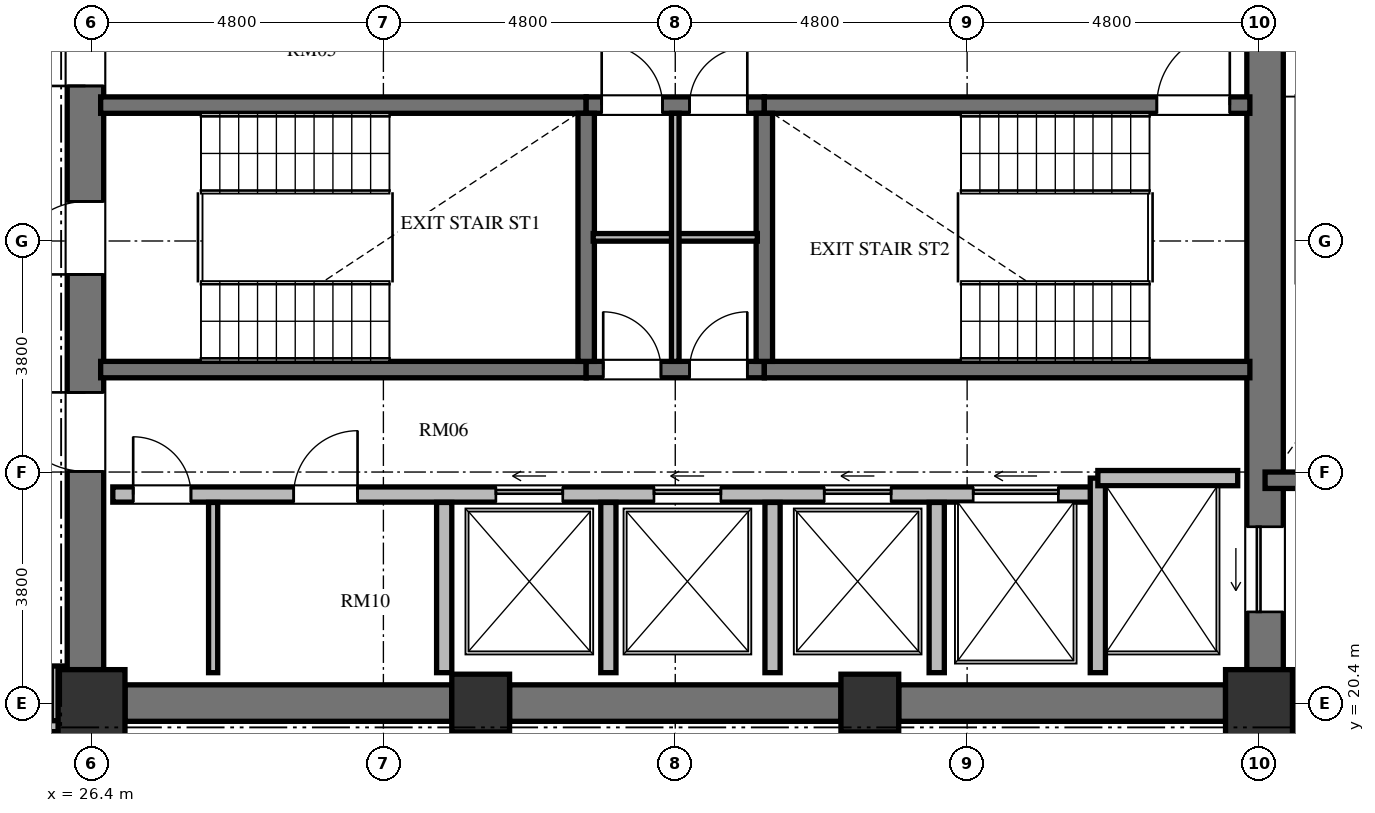
"""IFC4 building model, lengths in metres.
Left out: names, types, materials, properties, quantities, classifications, styles, units other than length and angle.
Written with IfcOpenShell. Run it as: python <this file> out.ifc"""

import sys

from ifc_helpers import new_model, si_unit, direction, frame, frame_2d, origin, origin_2d, place, context, subcontext, project, spatial, rectangle, extrude, element, fill, save


model = new_model("IFC4")
c1 = context("Model", 3, precision=1e-05, world=origin(), true_north=direction((0.0, 1.0)))
c2 = subcontext(c1, "Body", "Model", "MODEL_VIEW")
j1 = project(units=[si_unit("LENGTHUNIT", "METRE"), si_unit("PLANEANGLEUNIT", "RADIAN")], contexts=[c1])
p1 = place(None, origin())
s1 = spatial("IfcSite", under=j1, at=p1, CompositionType="ELEMENT")
p2 = place(p1, origin())
s2 = spatial("IfcBuilding", under=s1, at=p2, CompositionType="ELEMENT")
p3 = place(p2, frame((0.0, 0.0, 138.288)))
s3 = spatial("IfcBuildingStorey", under=s2, at=p3, CompositionType="ELEMENT", Elevation=138.288)
p4 = place(p3, frame((26.4, 20.4, 0.0), z_axis=(0.0, 0.0, 1.0), x_axis=(1.0, 0.0, 0.0)))
e1 = element("IfcColumn", 1, at=p4, inside=s3, PredefinedType="COLUMN", context=c2, shape_type="SweptSolid", body=[
    extrude(rectangle(XDim=1.1, YDim=1.1, at=origin_2d()), origin(), (0.0, 0.0, 1.0), 3.648),
])
for number, where, z_axis, x_axis in (
    (2, (32.8, 20.4, 0.0), (0.0, 0.0, 1.0), (1.0, 0.0, 0.0)),
    (3, (39.2, 20.4, 0.0), (0.0, 0.0, 1.0), (1.0, 0.0, 0.0)),
):
    element("IfcColumn", number, at=place(p3, frame(where, z_axis=z_axis, x_axis=x_axis)), inside=s3, PredefinedType="COLUMN", context=c2, shape_type="SweptSolid", body=[
        extrude(rectangle(XDim=0.95, YDim=0.95, at=origin_2d()), origin(), (0.0, 0.0, 1.0), 3.648),
    ])
p5 = place(p3, frame((45.6, 20.4, 0.0), z_axis=(0.0, 0.0, 1.0), x_axis=(1.0, 0.0, 0.0)))
e4 = element("IfcColumn", 4, at=p5, inside=s3, PredefinedType="COLUMN", context=c2, shape_type="SweptSolid", body=[
    extrude(rectangle(XDim=1.1, YDim=1.1, at=origin_2d()), origin(), (0.0, 0.0, 1.0), 3.648),
])
p6 = place(p3, frame((26.3, 20.95, 0.0), z_axis=(0.0, 0.0, 1.0), x_axis=(0.0, 1.0, 0.0)))
e5 = element("IfcWall", 5, at=p6, inside=s3, PredefinedType="SHEAR", context=c2, shape_type="SweptSolid", body=[
    extrude(rectangle(XDim=14.1, YDim=0.6, at=frame_2d((7.05, 0.0))), origin(), (0.0, 0.0, 1.0), 3.648),
])
p7 = place(p6, frame((6.5, 0.0, 0.0)))
e6 = element("IfcOpeningElement", 6, at=p7, cuts=e5, PredefinedType="OPENING", context=c2, shape_type="SweptSolid", body=[
    extrude(rectangle(XDim=1.2, YDim=2.15, at=frame_2d((0.6, 1.075))), frame((0.0, 0.31, 0.0), z_axis=(0.0, -1.0, 0.0), x_axis=(1.0, 0.0, 0.0)), (0.0, 0.0, 1.0), 0.62),
])
p8 = place(p6, frame((9.6, 0.0, 0.0)))
e7 = element("IfcOpeningElement", 7, at=p8, cuts=e5, PredefinedType="OPENING", context=c2, shape_type="SweptSolid", body=[
    extrude(rectangle(XDim=1.3, YDim=2.2, at=frame_2d((0.65, 1.1))), frame((0.0, 0.31, 0.0), z_axis=(0.0, -1.0, 0.0), x_axis=(1.0, 0.0, 0.0)), (0.0, 0.0, 1.0), 0.62),
])
p9 = place(p6, frame((3.26, 0.0, 0.0)))
e8 = element("IfcOpeningElement", 8, at=p9, cuts=e5, PredefinedType="OPENING", context=c2, shape_type="SweptSolid", body=[
    extrude(rectangle(XDim=1.3, YDim=2.2, at=frame_2d((0.65, 1.1))), frame((0.0, 0.31, 0.0), z_axis=(0.0, -1.0, 0.0), x_axis=(1.0, 0.0, 0.0)), (0.0, 0.0, 1.0), 0.62),
])
p10 = place(p3, frame((45.7, 20.95, 0.0), z_axis=(0.0, 0.0, 1.0), x_axis=(0.0, 1.0, 0.0)))
e9 = element("IfcWall", 9, at=p10, inside=s3, PredefinedType="SHEAR", context=c2, shape_type="SweptSolid", body=[
    extrude(rectangle(XDim=14.1, YDim=0.6, at=frame_2d((7.05, 0.0))), origin(), (0.0, 0.0, 1.0), 3.648),
])
p11 = place(p10, frame((11.75, 0.0, 0.0)))
e10 = element("IfcOpeningElement", 10, at=p11, cuts=e9, PredefinedType="OPENING", context=c2, shape_type="SweptSolid", body=[
    extrude(rectangle(XDim=1.4, YDim=2.3, at=frame_2d((0.7, 1.15))), frame((0.0, 0.31, 0.0), z_axis=(0.0, -1.0, 0.0), x_axis=(1.0, 0.0, 0.0)), (0.0, 0.0, 1.0), 0.62),
])
p12 = place(p10, frame((0.95, 0.0, 0.0)))
e11 = element("IfcOpeningElement", 11, at=p12, cuts=e9, PredefinedType="OPENING", context=c2, shape_type="SweptSolid", body=[
    extrude(rectangle(XDim=1.4, YDim=2.3, at=frame_2d((0.7, 1.15))), frame((0.0, 0.31, 0.0), z_axis=(0.0, -1.0, 0.0), x_axis=(1.0, 0.0, 0.0)), (0.0, 0.0, 1.0), 0.62),
])
p13 = place(p3, frame((26.95, 20.4, 0.0), z_axis=(0.0, 0.0, 1.0), x_axis=(1.0, 0.0, 0.0)))
e12 = element("IfcWall", 12, at=p13, inside=s3, PredefinedType="SHEAR", context=c2, shape_type="SweptSolid", body=[
    extrude(rectangle(XDim=5.375, YDim=0.6, at=frame_2d((2.688, 0.0))), origin(), (0.0, 0.0, 1.0), 3.648),
])
p14 = place(p3, frame((33.275, 20.4, 0.0), z_axis=(0.0, 0.0, 1.0), x_axis=(1.0, 0.0, 0.0)))
e13 = element("IfcWall", 13, at=p14, inside=s3, PredefinedType="SHEAR", context=c2, shape_type="SweptSolid", body=[
    extrude(rectangle(XDim=5.45, YDim=0.6, at=frame_2d((2.725, 0.0))), origin(), (0.0, 0.0, 1.0), 3.648),
])
p15 = place(p3, frame((39.675, 20.4, 0.0), z_axis=(0.0, 0.0, 1.0), x_axis=(1.0, 0.0, 0.0)))
e14 = element("IfcWall", 14, at=p15, inside=s3, PredefinedType="SHEAR", context=c2, shape_type="SweptSolid", body=[
    extrude(rectangle(XDim=5.375, YDim=0.6, at=frame_2d((2.688, 0.0))), origin(), (0.0, 0.0, 1.0), 3.648),
])
p16 = place(p3, frame((26.55, 30.235, 0.0), z_axis=(0.0, 0.0, 1.0), x_axis=(1.0, 0.0, 0.0)))
e15 = element("IfcWall", 15, at=p16, inside=s3, PredefinedType="SHEAR", context=c2, shape_type="SweptSolid", body=[
    extrude(rectangle(XDim=7.985, YDim=0.27, at=frame_2d((3.992, 0.0))), origin(), (0.0, 0.0, 1.0), 3.648),
])
p17 = place(p3, frame((34.535, 30.235, 0.0), z_axis=(0.0, 0.0, 1.0), x_axis=(1.0, 0.0, 0.0)))
e16 = element("IfcWall", 16, at=p17, inside=s3, PredefinedType="SHEAR", context=c2, shape_type="SweptSolid", body=[
    extrude(rectangle(XDim=2.93, YDim=0.27, at=frame_2d((1.465, 0.0))), origin(), (0.0, 0.0, 1.0), 3.648),
])
p18 = place(p17, frame((0.255, 0.0, 0.0)))
e17 = element("IfcOpeningElement", 17, at=p18, cuts=e16, PredefinedType="OPENING", context=c2, shape_type="SweptSolid", body=[
    extrude(rectangle(XDim=1.0, YDim=2.1, at=frame_2d((0.5, 1.05))), frame((0.0, 0.145, 0.0), z_axis=(0.0, -1.0, 0.0), x_axis=(1.0, 0.0, 0.0)), (0.0, 0.0, 1.0), 0.29),
])
p19 = place(p17, frame((1.7, 0.0, 0.0)))
e18 = element("IfcOpeningElement", 18, at=p19, cuts=e16, PredefinedType="OPENING", context=c2, shape_type="SweptSolid", body=[
    extrude(rectangle(XDim=0.95, YDim=2.1, at=frame_2d((0.475, 1.05))), frame((0.0, 0.145, 0.0), z_axis=(0.0, -1.0, 0.0), x_axis=(1.0, 0.0, 0.0)), (0.0, 0.0, 1.0), 0.29),
])
p20 = place(p3, frame((37.465, 30.235, 0.0), z_axis=(0.0, 0.0, 1.0), x_axis=(1.0, 0.0, 0.0)))
e19 = element("IfcWall", 19, at=p20, inside=s3, PredefinedType="SHEAR", context=c2, shape_type="SweptSolid", body=[
    extrude(rectangle(XDim=7.985, YDim=0.27, at=frame_2d((3.992, 0.0))), origin(), (0.0, 0.0, 1.0), 3.648),
])
p21 = place(p20, frame((6.455, 0.0, 0.0)))
e20 = element("IfcOpeningElement", 20, at=p21, cuts=e19, PredefinedType="OPENING", context=c2, shape_type="SweptSolid", body=[
    extrude(rectangle(XDim=1.2, YDim=2.15, at=frame_2d((0.6, 1.075))), frame((0.0, 0.145, 0.0), z_axis=(0.0, -1.0, 0.0), x_axis=(1.0, 0.0, 0.0)), (0.0, 0.0, 1.0), 0.29),
])
p22 = place(p3, frame((26.55, 25.885, 0.0), z_axis=(0.0, 0.0, 1.0), x_axis=(1.0, 0.0, 0.0)))
e21 = element("IfcWall", 21, at=p22, inside=s3, PredefinedType="SHEAR", context=c2, shape_type="SweptSolid", body=[
    extrude(rectangle(XDim=7.985, YDim=0.27, at=frame_2d((3.992, 0.0))), origin(), (0.0, 0.0, 1.0), 3.648),
])
p23 = place(p3, frame((34.535, 25.885, 0.0), z_axis=(0.0, 0.0, 1.0), x_axis=(1.0, 0.0, 0.0)))
e22 = element("IfcWall", 22, at=p23, inside=s3, PredefinedType="SHEAR", context=c2, shape_type="SweptSolid", body=[
    extrude(rectangle(XDim=2.93, YDim=0.27, at=frame_2d((1.465, 0.0))), origin(), (0.0, 0.0, 1.0), 3.648),
])
p24 = place(p23, frame((0.28, 0.0, 0.0)))
e23 = element("IfcOpeningElement", 23, at=p24, cuts=e22, PredefinedType="OPENING", context=c2, shape_type="SweptSolid", body=[
    extrude(rectangle(XDim=0.95, YDim=2.1, at=frame_2d((0.475, 1.05))), frame((0.0, 0.145, 0.0), z_axis=(0.0, -1.0, 0.0), x_axis=(1.0, 0.0, 0.0)), (0.0, 0.0, 1.0), 0.29),
])
p25 = place(p23, frame((1.7, 0.0, 0.0)))
e24 = element("IfcOpeningElement", 24, at=p25, cuts=e22, PredefinedType="OPENING", context=c2, shape_type="SweptSolid", body=[
    extrude(rectangle(XDim=0.95, YDim=2.1, at=frame_2d((0.475, 1.05))), frame((0.0, 0.145, 0.0), z_axis=(0.0, -1.0, 0.0), x_axis=(1.0, 0.0, 0.0)), (0.0, 0.0, 1.0), 0.29),
])
p26 = place(p3, frame((37.465, 25.885, 0.0), z_axis=(0.0, 0.0, 1.0), x_axis=(1.0, 0.0, 0.0)))
e25 = element("IfcWall", 25, at=p26, inside=s3, PredefinedType="SHEAR", context=c2, shape_type="SweptSolid", body=[
    extrude(rectangle(XDim=7.985, YDim=0.27, at=frame_2d((3.992, 0.0))), origin(), (0.0, 0.0, 1.0), 3.648),
])
for number, where, z_axis, x_axis in (
    (26, (34.535, 26.02, 0.0), (0.0, 0.0, 1.0), (0.0, 1.0, 0.0)),
    (27, (37.465, 26.02, 0.0), (0.0, 0.0, 1.0), (0.0, 1.0, 0.0)),
):
    element("IfcWall", number, at=place(p3, frame(where, z_axis=z_axis, x_axis=x_axis)), inside=s3, PredefinedType="SHEAR", context=c2, shape_type="SweptSolid", body=[
        extrude(rectangle(XDim=4.08, YDim=0.27, at=frame_2d((2.04, 0.0))), origin(), (0.0, 0.0, 1.0), 3.648),
    ])
p27 = place(p3, frame((34.65, 28.06, 0.0), z_axis=(0.0, 0.0, 1.0), x_axis=(1.0, 0.0, 0.0)))
e28 = element("IfcWall", 28, at=p27, inside=s3, PredefinedType="PARTITIONING", context=c2, shape_type="SweptSolid", body=[
    extrude(rectangle(XDim=2.7, YDim=0.125, at=frame_2d((1.35, 0.0))), origin(), (0.0, 0.0, 1.0), 3.428),
])
p28 = place(p3, frame((36.0, 26.02, 0.0), z_axis=(0.0, 0.0, 1.0), x_axis=(0.0, 1.0, 0.0)))
e29 = element("IfcWall", 29, at=p28, inside=s3, PredefinedType="PARTITIONING", context=c2, shape_type="SweptSolid", body=[
    extrude(rectangle(XDim=4.08, YDim=0.125, at=frame_2d((2.04, 0.0))), origin(), (0.0, 0.0, 1.0), 3.428),
])
p29 = place(p3, frame((26.75, 23.83, 0.0), z_axis=(0.0, 0.0, 1.0), x_axis=(1.0, 0.0, 0.0)))
e30 = element("IfcWall", 30, at=p29, inside=s3, PredefinedType="SOLIDWALL", context=c2, shape_type="SweptSolid", body=[
    extrude(rectangle(XDim=16.2, YDim=0.25, at=frame_2d((8.1, 0.0))), origin(), (0.0, 0.0, 1.0), 3.428),
])
p30 = place(p29, frame((0.335, 0.0, 0.0)))
e31 = element("IfcOpeningElement", 31, at=p30, cuts=e30, PredefinedType="OPENING", context=c2, shape_type="SweptSolid", body=[
    extrude(rectangle(XDim=0.95, YDim=2.1, at=frame_2d((0.475, 1.05))), frame((0.0, 0.135, 0.0), z_axis=(0.0, -1.0, 0.0), x_axis=(1.0, 0.0, 0.0)), (0.0, 0.0, 1.0), 0.27),
])
p31 = place(p29, frame((2.975, 0.0, 0.0)))
e32 = element("IfcOpeningElement", 32, at=p31, cuts=e30, PredefinedType="OPENING", context=c2, shape_type="SweptSolid", body=[
    extrude(rectangle(XDim=1.05, YDim=2.15, at=frame_2d((0.525, 1.075))), frame((0.0, 0.135, 0.0), z_axis=(0.0, -1.0, 0.0), x_axis=(1.0, 0.0, 0.0)), (0.0, 0.0, 1.0), 0.27),
])
p32 = place(p29, frame((6.3, 0.0, 0.0)))
e33 = element("IfcOpeningElement", 33, at=p32, cuts=e30, PredefinedType="OPENING", context=c2, shape_type="SweptSolid", body=[
    extrude(rectangle(XDim=1.1, YDim=2.2, at=frame_2d((0.55, 1.1))), frame((0.0, 0.135, 0.0), z_axis=(0.0, -1.0, 0.0), x_axis=(1.0, 0.0, 0.0)), (0.0, 0.0, 1.0), 0.27),
])
p33 = place(p29, frame((8.9, 0.0, 0.0)))
e34 = element("IfcOpeningElement", 34, at=p33, cuts=e30, PredefinedType="OPENING", context=c2, shape_type="SweptSolid", body=[
    extrude(rectangle(XDim=1.1, YDim=2.2, at=frame_2d((0.55, 1.1))), frame((0.0, 0.135, 0.0), z_axis=(0.0, -1.0, 0.0), x_axis=(1.0, 0.0, 0.0)), (0.0, 0.0, 1.0), 0.27),
])
p34 = place(p29, frame((11.7, 0.0, 0.0)))
e35 = element("IfcOpeningElement", 35, at=p34, cuts=e30, PredefinedType="OPENING", context=c2, shape_type="SweptSolid", body=[
    extrude(rectangle(XDim=1.1, YDim=2.2, at=frame_2d((0.55, 1.1))), frame((0.0, 0.135, 0.0), z_axis=(0.0, -1.0, 0.0), x_axis=(1.0, 0.0, 0.0)), (0.0, 0.0, 1.0), 0.27),
])
p35 = place(p29, frame((14.15, 0.0, 0.0)))
e36 = element("IfcOpeningElement", 36, at=p35, cuts=e30, PredefinedType="OPENING", context=c2, shape_type="SweptSolid", body=[
    extrude(rectangle(XDim=1.4, YDim=2.3, at=frame_2d((0.7, 1.15))), frame((0.0, 0.135, 0.0), z_axis=(0.0, -1.0, 0.0), x_axis=(1.0, 0.0, 0.0)), (0.0, 0.0, 1.0), 0.27),
])
p36 = place(p3, frame((42.95, 20.9, 0.0), z_axis=(0.0, 0.0, 1.0), x_axis=(0.0, 1.0, 0.0)))
e37 = element("IfcWall", 37, at=p36, inside=s3, PredefinedType="SOLIDWALL", context=c2, shape_type="SweptSolid", body=[
    extrude(rectangle(XDim=3.2, YDim=0.25, at=frame_2d((1.6, 0.0))), origin(), (0.0, 0.0, 1.0), 3.428),
])
p37 = place(p3, frame((42.95, 24.1, 0.0), z_axis=(0.0, 0.0, 1.0), x_axis=(1.0, 0.0, 0.0)))
e38 = element("IfcWall", 38, at=p37, inside=s3, PredefinedType="SOLIDWALL", context=c2, shape_type="SweptSolid", body=[
    extrude(rectangle(XDim=2.3, YDim=0.25, at=frame_2d((1.15, 0.0))), origin(), (0.0, 0.0, 1.0), 3.428),
])
for number, where, z_axis, x_axis in (
    (39, (32.2, 20.9, 0.0), (0.0, 0.0, 1.0), (0.0, 1.0, 0.0)),
    (40, (34.9, 20.9, 0.0), (0.0, 0.0, 1.0), (0.0, 1.0, 0.0)),
    (41, (37.6, 20.9, 0.0), (0.0, 0.0, 1.0), (0.0, 1.0, 0.0)),
    (42, (40.3, 20.9, 0.0), (0.0, 0.0, 1.0), (0.0, 1.0, 0.0)),
):
    element("IfcWall", number, at=place(p3, frame(where, z_axis=z_axis, x_axis=x_axis)), inside=s3, PredefinedType="SOLIDWALL", context=c2, shape_type="SweptSolid", body=[
        extrude(rectangle(XDim=2.8, YDim=0.25, at=frame_2d((1.4, 0.0))), origin(), (0.0, 0.0, 1.0), 3.428),
    ])
p38 = place(p3, frame((28.4, 20.9, 0.0), z_axis=(0.0, 0.0, 1.0), x_axis=(0.0, 1.0, 0.0)))
e43 = element("IfcWall", 43, at=p38, inside=s3, PredefinedType="PARTITIONING", context=c2, shape_type="SweptSolid", body=[
    extrude(rectangle(XDim=2.8, YDim=0.15, at=frame_2d((1.4, 0.0))), origin(), (0.0, 0.0, 1.0), 3.428),
])
p39 = place(p3, frame((45.7, 24.065, 0.0), z_axis=(0.0, 0.0, 1.0), x_axis=(1.0, 0.0, 0.0)))
e44 = element("IfcWall", 44, at=p39, inside=s3, PredefinedType="SHEAR", context=c2, shape_type="SweptSolid", body=[
    extrude(rectangle(XDim=4.715, YDim=0.27, at=frame_2d((2.357, 0.0))), origin(), (0.0, 0.0, 1.0), 3.648),
])
p40 = place(p3, frame((45.7, 20.02, 0.0), z_axis=(0.0, 0.0, 1.0), x_axis=(1.0, 0.0, 0.0)))
e45 = element("IfcWall", 45, at=p40, inside=s3, PredefinedType="SOLIDWALL", context=c2, shape_type="SweptSolid", body=[
    extrude(rectangle(XDim=4.715, YDim=0.25, at=frame_2d((2.357, 0.0))), origin(), (0.0, 0.0, 1.0), 3.428),
])
p41 = place(p3, frame((25.83, 21.01, 0.0), z_axis=(0.0, 0.0, 1.0), x_axis=(0.0, -1.0, 0.0)))
e46 = element("IfcWall", 46, at=p41, inside=s3, PredefinedType="PARTITIONING", context=c2, shape_type="SweptSolid", body=[
    extrude(rectangle(XDim=1.03, YDim=0.18, at=frame_2d((0.515, 0.0))), origin(), (0.0, 0.0, 1.0), 3.428),
])
p42 = place(p3, frame((25.87, 20.02, 0.0), z_axis=(0.0, 0.0, 1.0), x_axis=(-1.0, 0.0, 0.0)))
e47 = element("IfcWall", 47, at=p42, inside=s3, PredefinedType="PARTITIONING", context=c2, shape_type="SweptSolid", body=[
    extrude(rectangle(XDim=2.56, YDim=0.18, at=frame_2d((1.28, 0.0))), origin(), (0.0, 0.0, 1.0), 3.428),
])
p43 = place(p7, origin())
e48 = element("IfcDoor", 48, at=p43, inside=s3, OperationType="SINGLE_SWING_LEFT", PredefinedType="DOOR", context=c2, shape_type="SweptSolid", body=[
    extrude(rectangle(XDim=1.2, YDim=2.15, at=frame_2d((0.6, 1.075))), frame((0.0, 0.025, 0.0), z_axis=(0.0, -1.0, 0.0), x_axis=(1.0, 0.0, 0.0)), (0.0, 0.0, 1.0), 0.05),
])
fill(e6, e48)
p44 = place(p21, origin())
e49 = element("IfcDoor", 49, at=p44, inside=s3, OperationType="SINGLE_SWING_RIGHT", PredefinedType="DOOR", context=c2, shape_type="SweptSolid", body=[
    extrude(rectangle(XDim=1.2, YDim=2.15, at=frame_2d((0.6, 1.075))), frame((0.0, 0.025, 0.0), z_axis=(0.0, -1.0, 0.0), x_axis=(1.0, 0.0, 0.0)), (0.0, 0.0, 1.0), 0.05),
])
fill(e20, e49)
p45 = place(p24, origin())
e50 = element("IfcDoor", 50, at=p45, inside=s3, OperationType="SINGLE_SWING_LEFT", PredefinedType="DOOR", context=c2, shape_type="SweptSolid", body=[
    extrude(rectangle(XDim=0.95, YDim=2.1, at=frame_2d((0.475, 1.05))), frame((0.0, 0.025, 0.0), z_axis=(0.0, -1.0, 0.0), x_axis=(1.0, 0.0, 0.0)), (0.0, 0.0, 1.0), 0.05),
])
fill(e23, e50)
p46 = place(p25, origin())
e51 = element("IfcDoor", 51, at=p46, inside=s3, OperationType="SINGLE_SWING_RIGHT", PredefinedType="DOOR", context=c2, shape_type="SweptSolid", body=[
    extrude(rectangle(XDim=0.95, YDim=2.1, at=frame_2d((0.475, 1.05))), frame((0.0, 0.025, 0.0), z_axis=(0.0, -1.0, 0.0), x_axis=(1.0, 0.0, 0.0)), (0.0, 0.0, 1.0), 0.05),
])
fill(e24, e51)
p47 = place(p18, origin())
e52 = element("IfcDoor", 52, at=p47, inside=s3, OperationType="SINGLE_SWING_LEFT", PredefinedType="DOOR", context=c2, shape_type="SweptSolid", body=[
    extrude(rectangle(XDim=1.0, YDim=2.1, at=frame_2d((0.5, 1.05))), frame((0.0, 0.025, 0.0), z_axis=(0.0, -1.0, 0.0), x_axis=(1.0, 0.0, 0.0)), (0.0, 0.0, 1.0), 0.05),
])
fill(e17, e52)
p48 = place(p19, origin())
e53 = element("IfcDoor", 53, at=p48, inside=s3, OperationType="SINGLE_SWING_RIGHT", PredefinedType="DOOR", context=c2, shape_type="SweptSolid", body=[
    extrude(rectangle(XDim=0.95, YDim=2.1, at=frame_2d((0.475, 1.05))), frame((0.0, 0.025, 0.0), z_axis=(0.0, -1.0, 0.0), x_axis=(1.0, 0.0, 0.0)), (0.0, 0.0, 1.0), 0.05),
])
fill(e18, e53)
p49 = place(p8, origin())
e54 = element("IfcDoor", 54, at=p49, inside=s3, OperationType="SINGLE_SWING_LEFT", PredefinedType="DOOR", context=c2, shape_type="SweptSolid", body=[
    extrude(rectangle(XDim=1.3, YDim=2.2, at=frame_2d((0.65, 1.1))), frame((0.0, 0.025, 0.0), z_axis=(0.0, -1.0, 0.0), x_axis=(1.0, 0.0, 0.0)), (0.0, 0.0, 1.0), 0.05),
])
fill(e7, e54)
p50 = place(p9, origin())
e55 = element("IfcDoor", 55, at=p50, inside=s3, OperationType="SINGLE_SWING_RIGHT", PredefinedType="DOOR", context=c2, shape_type="SweptSolid", body=[
    extrude(rectangle(XDim=1.3, YDim=2.2, at=frame_2d((0.65, 1.1))), frame((0.0, 0.025, 0.0), z_axis=(0.0, -1.0, 0.0), x_axis=(1.0, 0.0, 0.0)), (0.0, 0.0, 1.0), 0.05),
])
fill(e8, e55)
p51 = place(p30, origin())
e56 = element("IfcDoor", 56, at=p51, inside=s3, OperationType="SINGLE_SWING_LEFT", PredefinedType="DOOR", context=c2, shape_type="SweptSolid", body=[
    extrude(rectangle(XDim=0.95, YDim=2.1, at=frame_2d((0.475, 1.05))), frame((0.0, 0.025, 0.0), z_axis=(0.0, -1.0, 0.0), x_axis=(1.0, 0.0, 0.0)), (0.0, 0.0, 1.0), 0.05),
])
fill(e31, e56)
p52 = place(p31, origin())
e57 = element("IfcDoor", 57, at=p52, inside=s3, OperationType="SINGLE_SWING_RIGHT", PredefinedType="DOOR", context=c2, shape_type="SweptSolid", body=[
    extrude(rectangle(XDim=1.05, YDim=2.15, at=frame_2d((0.525, 1.075))), frame((0.0, 0.025, 0.0), z_axis=(0.0, -1.0, 0.0), x_axis=(1.0, 0.0, 0.0)), (0.0, 0.0, 1.0), 0.05),
])
fill(e32, e57)
p53 = place(p32, origin())
e58 = element("IfcDoor", 58, at=p53, inside=s3, OperationType="SLIDING_TO_LEFT", PredefinedType="DOOR", context=c2, shape_type="SweptSolid", body=[
    extrude(rectangle(XDim=1.1, YDim=2.2, at=frame_2d((0.55, 1.1))), frame((0.0, 0.025, 0.0), z_axis=(0.0, -1.0, 0.0), x_axis=(1.0, 0.0, 0.0)), (0.0, 0.0, 1.0), 0.05),
])
fill(e33, e58)
p54 = place(p33, origin())
e59 = element("IfcDoor", 59, at=p54, inside=s3, OperationType="SLIDING_TO_LEFT", PredefinedType="DOOR", context=c2, shape_type="SweptSolid", body=[
    extrude(rectangle(XDim=1.1, YDim=2.2, at=frame_2d((0.55, 1.1))), frame((0.0, 0.025, 0.0), z_axis=(0.0, -1.0, 0.0), x_axis=(1.0, 0.0, 0.0)), (0.0, 0.0, 1.0), 0.05),
])
fill(e34, e59)
p55 = place(p34, origin())
e60 = element("IfcDoor", 60, at=p55, inside=s3, OperationType="SLIDING_TO_LEFT", PredefinedType="DOOR", context=c2, shape_type="SweptSolid", body=[
    extrude(rectangle(XDim=1.1, YDim=2.2, at=frame_2d((0.55, 1.1))), frame((0.0, 0.025, 0.0), z_axis=(0.0, -1.0, 0.0), x_axis=(1.0, 0.0, 0.0)), (0.0, 0.0, 1.0), 0.05),
])
fill(e35, e60)
p56 = place(p12, origin())
e61 = element("IfcDoor", 61, at=p56, inside=s3, OperationType="SLIDING_TO_LEFT", PredefinedType="DOOR", context=c2, shape_type="SweptSolid", body=[
    extrude(rectangle(XDim=1.4, YDim=2.3, at=frame_2d((0.7, 1.15))), frame((0.0, 0.025, 0.0), z_axis=(0.0, -1.0, 0.0), x_axis=(1.0, 0.0, 0.0)), (0.0, 0.0, 1.0), 0.05),
])
fill(e11, e61)
p57 = place(p35, origin())
e62 = element("IfcDoor", 62, at=p57, inside=s3, OperationType="SLIDING_TO_LEFT", PredefinedType="DOOR", context=c2, shape_type="SweptSolid", body=[
    extrude(rectangle(XDim=1.4, YDim=2.3, at=frame_2d((0.7, 1.15))), frame((0.0, 0.025, 0.0), z_axis=(0.0, -1.0, 0.0), x_axis=(1.0, 0.0, 0.0)), (0.0, 0.0, 1.0), 0.05),
])
fill(e36, e62)
save(model, sys.argv[1])
